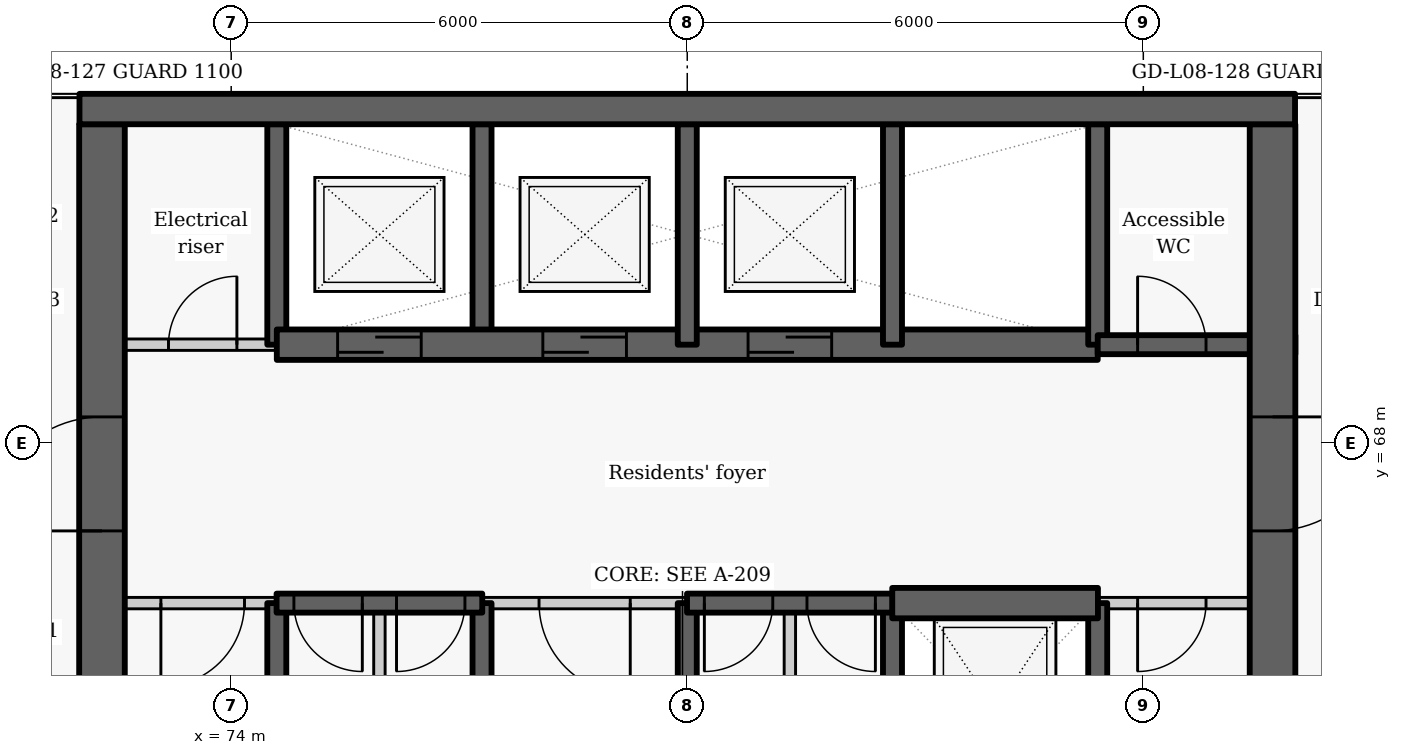
"""IFC4 building model, lengths in metres.
Left out: names, types, materials, properties, quantities, classifications, styles, units other than length and angle.
Written with IfcOpenShell. Run it as: python <this file> out.ifc"""

import sys

from ifc_helpers import new_model, si_unit, direction, frame, frame_2d, origin, place, context, subcontext, project, spatial, rectangle, extrude, element, fill, save


model = new_model("IFC4")
c1 = context("Model", 3, precision=1e-05, world=origin(), true_north=direction((0.0, 1.0)))
c2 = subcontext(c1, "Body", "Model", "MODEL_VIEW")
j1 = project(units=[si_unit("LENGTHUNIT", "METRE"), si_unit("PLANEANGLEUNIT", "RADIAN")], contexts=[c1])
p1 = place(None, origin())
s1 = spatial("IfcSite", under=j1, at=p1, CompositionType="ELEMENT")
p2 = place(p1, origin())
s2 = spatial("IfcBuilding", under=s1, at=p2, CompositionType="ELEMENT")
p3 = place(p2, frame((0.0, 0.0, 34.8)))
s3 = spatial("IfcBuildingStorey", under=s2, at=p3, CompositionType="ELEMENT", Elevation=34.8)
p4 = place(p3, frame((74.6, 63.1, -0.275), z_axis=(0.0, 0.0, 1.0), x_axis=(0.0, 1.0, 0.0)))
e1 = element("IfcWall", 1, at=p4, inside=s3, PredefinedType="SHEAR", context=c2, shape_type="SweptSolid", body=[
    extrude(rectangle(XDim=2.8, YDim=0.25, at=frame_2d((1.4, 0.0))), origin(), (0.0, 0.0, 1.0), 3.175),
])
p5 = place(p3, frame((74.6, 69.3, -0.275), z_axis=(0.0, 0.0, 1.0), x_axis=(0.0, 1.0, 0.0)))
e2 = element("IfcWall", 2, at=p5, inside=s3, PredefinedType="SHEAR", context=c2, shape_type="SweptSolid", body=[
    extrude(rectangle(XDim=2.9, YDim=0.25, at=frame_2d((1.45, 0.0))), origin(), (0.0, 0.0, 1.0), 3.175),
])
p6 = place(p3, frame((72.0, 69.3, 0.0), z_axis=(0.0, 0.0, 1.0), x_axis=(1.0, 0.0, 0.0)))
e3 = element("IfcWall", 3, at=p6, inside=s3, PredefinedType="PARTITIONING", context=c2, shape_type="SweptSolid", body=[
    extrude(rectangle(XDim=2.6, YDim=0.15, at=frame_2d((1.3, 0.0))), origin(), (0.0, 0.0, 1.0), 2.9),
])
p7 = place(p6, frame((1.175, 0.0, 0.0)))
e4 = element("IfcOpeningElement", 4, at=p7, cuts=e3, PredefinedType="OPENING", context=c2, shape_type="SweptSolid", body=[
    extrude(rectangle(XDim=0.9, YDim=2.1, at=frame_2d((0.45, 1.05))), frame((0.0, 0.085, 0.0), z_axis=(0.0, -1.0, 0.0), x_axis=(1.0, 0.0, 0.0)), (0.0, 0.0, 1.0), 0.17),
])
p8 = place(p3, frame((72.3, 63.1, -0.275), z_axis=(0.0, 0.0, 1.0), x_axis=(0.0, 1.0, 0.0)))
e5 = element("IfcWall", 5, at=p8, inside=s3, PredefinedType="SHEAR", context=c2, shape_type="SweptSolid", body=[
    extrude(rectangle(XDim=9.1, YDim=0.6, at=frame_2d((4.55, 0.0))), origin(), (0.0, 0.0, 1.0), 3.175),
])
p9 = place(p8, frame((3.75, 0.0, 0.275)))
e6 = element("IfcOpeningElement", 6, at=p9, cuts=e5, PredefinedType="OPENING", context=c2, shape_type="SweptSolid", body=[
    extrude(rectangle(XDim=1.5, YDim=2.1, at=frame_2d((0.75, 1.05))), frame((0.0, 0.31, 0.0), z_axis=(0.0, -1.0, 0.0), x_axis=(1.0, 0.0, 0.0)), (0.0, 0.0, 1.0), 0.62),
])
p10 = place(p3, frame((77.3, 63.1, -0.275), z_axis=(0.0, 0.0, 1.0), x_axis=(0.0, 1.0, 0.0)))
e7 = element("IfcWall", 7, at=p10, inside=s3, PredefinedType="SHEAR", context=c2, shape_type="SweptSolid", body=[
    extrude(rectangle(XDim=2.8, YDim=0.25, at=frame_2d((1.4, 0.0))), origin(), (0.0, 0.0, 1.0), 3.175),
])
p11 = place(p3, frame((77.3, 69.3, -0.275), z_axis=(0.0, 0.0, 1.0), x_axis=(0.0, 1.0, 0.0)))
e8 = element("IfcWall", 8, at=p11, inside=s3, PredefinedType="SHEAR", context=c2, shape_type="SweptSolid", body=[
    extrude(rectangle(XDim=2.9, YDim=0.25, at=frame_2d((1.45, 0.0))), origin(), (0.0, 0.0, 1.0), 3.175),
])
p12 = place(p3, frame((74.6, 69.3, -0.275), z_axis=(0.0, 0.0, 1.0), x_axis=(1.0, 0.0, 0.0)))
e9 = element("IfcWall", 9, at=p12, inside=s3, PredefinedType="SHEAR", context=c2, shape_type="SweptSolid", body=[
    extrude(rectangle(XDim=10.8, YDim=0.4, at=frame_2d((5.4, 0.0))), origin(), (0.0, 0.0, 1.0), 3.175),
])
p13 = place(p12, frame((0.8, 0.0, 0.275)))
e10 = element("IfcOpeningElement", 10, at=p13, cuts=e9, PredefinedType="OPENING", context=c2, shape_type="SweptSolid", body=[
    extrude(rectangle(XDim=1.1, YDim=2.1, at=frame_2d((0.55, 1.05))), frame((0.0, 0.21, 0.0), z_axis=(0.0, -1.0, 0.0), x_axis=(1.0, 0.0, 0.0)), (0.0, 0.0, 1.0), 0.42),
])
p14 = place(p12, frame((3.5, 0.0, 0.275)))
e11 = element("IfcOpeningElement", 11, at=p14, cuts=e9, PredefinedType="OPENING", context=c2, shape_type="SweptSolid", body=[
    extrude(rectangle(XDim=1.1, YDim=2.1, at=frame_2d((0.55, 1.05))), frame((0.0, 0.21, 0.0), z_axis=(0.0, -1.0, 0.0), x_axis=(1.0, 0.0, 0.0)), (0.0, 0.0, 1.0), 0.42),
])
p15 = place(p12, frame((6.2, 0.0, 0.275)))
e12 = element("IfcOpeningElement", 12, at=p15, cuts=e9, PredefinedType="OPENING", context=c2, shape_type="SweptSolid", body=[
    extrude(rectangle(XDim=1.1, YDim=2.1, at=frame_2d((0.55, 1.05))), frame((0.0, 0.21, 0.0), z_axis=(0.0, -1.0, 0.0), x_axis=(1.0, 0.0, 0.0)), (0.0, 0.0, 1.0), 0.42),
])
p16 = place(p3, frame((80.0, 63.1, -0.275), z_axis=(0.0, 0.0, 1.0), x_axis=(0.0, 1.0, 0.0)))
e13 = element("IfcWall", 13, at=p16, inside=s3, PredefinedType="SHEAR", context=c2, shape_type="SweptSolid", body=[
    extrude(rectangle(XDim=2.8, YDim=0.25, at=frame_2d((1.4, 0.0))), origin(), (0.0, 0.0, 1.0), 3.175),
])
p17 = place(p3, frame((80.0, 69.3, -0.275), z_axis=(0.0, 0.0, 1.0), x_axis=(0.0, 1.0, 0.0)))
e14 = element("IfcWall", 14, at=p17, inside=s3, PredefinedType="SHEAR", context=c2, shape_type="SweptSolid", body=[
    extrude(rectangle(XDim=2.9, YDim=0.25, at=frame_2d((1.45, 0.0))), origin(), (0.0, 0.0, 1.0), 3.175),
])
p18 = place(p3, frame((82.7, 63.1, -0.275), z_axis=(0.0, 0.0, 1.0), x_axis=(0.0, 1.0, 0.0)))
e15 = element("IfcWall", 15, at=p18, inside=s3, PredefinedType="SHEAR", context=c2, shape_type="SweptSolid", body=[
    extrude(rectangle(XDim=2.8, YDim=0.25, at=frame_2d((1.4, 0.0))), origin(), (0.0, 0.0, 1.0), 3.175),
])
p19 = place(p3, frame((82.7, 69.3, -0.275), z_axis=(0.0, 0.0, 1.0), x_axis=(0.0, 1.0, 0.0)))
e16 = element("IfcWall", 16, at=p19, inside=s3, PredefinedType="SHEAR", context=c2, shape_type="SweptSolid", body=[
    extrude(rectangle(XDim=2.9, YDim=0.25, at=frame_2d((1.45, 0.0))), origin(), (0.0, 0.0, 1.0), 3.175),
])
p20 = place(p3, frame((85.4, 63.1, -0.275), z_axis=(0.0, 0.0, 1.0), x_axis=(0.0, 1.0, 0.0)))
e17 = element("IfcWall", 17, at=p20, inside=s3, PredefinedType="SHEAR", context=c2, shape_type="SweptSolid", body=[
    extrude(rectangle(XDim=2.8, YDim=0.25, at=frame_2d((1.4, 0.0))), origin(), (0.0, 0.0, 1.0), 3.175),
])
p21 = place(p3, frame((85.4, 69.3, -0.275), z_axis=(0.0, 0.0, 1.0), x_axis=(0.0, 1.0, 0.0)))
e18 = element("IfcWall", 18, at=p21, inside=s3, PredefinedType="SHEAR", context=c2, shape_type="SweptSolid", body=[
    extrude(rectangle(XDim=2.9, YDim=0.25, at=frame_2d((1.45, 0.0))), origin(), (0.0, 0.0, 1.0), 3.175),
])
p22 = place(p3, frame((85.4, 69.3, -0.275), z_axis=(0.0, 0.0, 1.0), x_axis=(1.0, 0.0, 0.0)))
e19 = element("IfcWall", 19, at=p22, inside=s3, PredefinedType="SHEAR", context=c2, shape_type="SweptSolid", body=[
    extrude(rectangle(XDim=2.6, YDim=0.25, at=frame_2d((1.3, 0.0))), origin(), (0.0, 0.0, 1.0), 3.175),
])
p23 = place(p22, frame((0.525, 0.0, 0.275)))
e20 = element("IfcOpeningElement", 20, at=p23, cuts=e19, PredefinedType="OPENING", context=c2, shape_type="SweptSolid", body=[
    extrude(rectangle(XDim=0.9, YDim=2.1, at=frame_2d((0.45, 1.05))), frame((0.0, 0.135, 0.0), z_axis=(0.0, -1.0, 0.0), x_axis=(1.0, 0.0, 0.0)), (0.0, 0.0, 1.0), 0.27),
])
p24 = place(p3, frame((87.7, 72.2, -0.275), z_axis=(0.0, 0.0, 1.0), x_axis=(0.0, -1.0, 0.0)))
e21 = element("IfcWall", 21, at=p24, inside=s3, PredefinedType="SHEAR", context=c2, shape_type="SweptSolid", body=[
    extrude(rectangle(XDim=15.6, YDim=0.6, at=frame_2d((7.8, 0.0))), origin(), (0.0, 0.0, 1.0), 3.175),
])
p25 = place(p24, frame((3.85, 0.0, 0.275)))
e22 = element("IfcOpeningElement", 22, at=p25, cuts=e21, PredefinedType="OPENING", context=c2, shape_type="SweptSolid", body=[
    extrude(rectangle(XDim=1.5, YDim=2.1, at=frame_2d((0.75, 1.05))), frame((0.0, 0.31, 0.0), z_axis=(0.0, -1.0, 0.0), x_axis=(1.0, 0.0, 0.0)), (0.0, 0.0, 1.0), 0.62),
])
p26 = place(p24, frame((11.8, 0.0, 0.275)))
e23 = element("IfcOpeningElement", 23, at=p26, cuts=e21, PredefinedType="OPENING", context=c2, shape_type="SweptSolid", body=[
    extrude(rectangle(XDim=1.1, YDim=2.1, at=frame_2d((0.55, 1.05))), frame((0.0, 0.31, 0.0), z_axis=(0.0, -1.0, 0.0), x_axis=(1.0, 0.0, 0.0)), (0.0, 0.0, 1.0), 0.62),
])
p27 = place(p3, frame((74.603, 65.9, 0.0), z_axis=(0.0, 0.0, 1.0), x_axis=(-1.0, 0.0, 0.0)))
e24 = element("IfcWall", 24, at=p27, inside=s3, PredefinedType="PARTITIONING", context=c2, shape_type="SweptSolid", body=[
    extrude(rectangle(XDim=2.603, YDim=0.15, at=frame_2d((1.302, 0.0))), origin(), (0.0, 0.0, 1.0), 2.9),
])
p28 = place(p27, frame((0.428, 0.0, 0.0)))
e25 = element("IfcOpeningElement", 25, at=p28, cuts=e24, PredefinedType="OPENING", context=c2, shape_type="SweptSolid", body=[
    extrude(rectangle(XDim=1.1, YDim=2.1, at=frame_2d((0.55, 1.05))), frame((0.0, 0.085, 0.0), z_axis=(0.0, -1.0, 0.0), x_axis=(1.0, 0.0, 0.0)), (0.0, 0.0, 1.0), 0.17),
])
p29 = place(p3, frame((80.003, 65.9, 0.0), z_axis=(0.0, 0.0, 1.0), x_axis=(-1.0, 0.0, 0.0)))
e26 = element("IfcWall", 26, at=p29, inside=s3, PredefinedType="PARTITIONING", context=c2, shape_type="SweptSolid", body=[
    extrude(rectangle(XDim=2.706, YDim=0.15, at=frame_2d((1.353, 0.0))), origin(), (0.0, 0.0, 1.0), 2.9),
])
p30 = place(p29, frame((0.753, 0.0, 0.0)))
e27 = element("IfcOpeningElement", 27, at=p30, cuts=e26, PredefinedType="OPENING", context=c2, shape_type="SweptSolid", body=[
    extrude(rectangle(XDim=1.2, YDim=2.1, at=frame_2d((0.6, 1.05))), frame((0.0, 0.085, 0.0), z_axis=(0.0, -1.0, 0.0), x_axis=(1.0, 0.0, 0.0)), (0.0, 0.0, 1.0), 0.17),
])
p31 = place(p3, frame((88.0, 65.9, 0.0), z_axis=(0.0, 0.0, 1.0), x_axis=(-1.0, 0.0, 0.0)))
e28 = element("IfcWall", 28, at=p31, inside=s3, PredefinedType="PARTITIONING", context=c2, shape_type="SweptSolid", body=[
    extrude(rectangle(XDim=2.603, YDim=0.15, at=frame_2d((1.302, 0.0))), origin(), (0.0, 0.0, 1.0), 2.9),
])
p32 = place(p31, frame((1.175, 0.0, 0.0)))
e29 = element("IfcOpeningElement", 29, at=p32, cuts=e28, PredefinedType="OPENING", context=c2, shape_type="SweptSolid", body=[
    extrude(rectangle(XDim=0.9, YDim=2.1, at=frame_2d((0.45, 1.05))), frame((0.0, 0.085, 0.0), z_axis=(0.0, -1.0, 0.0), x_axis=(1.0, 0.0, 0.0)), (0.0, 0.0, 1.0), 0.17),
])
p33 = place(p3, frame((77.303, 65.9, -0.275), z_axis=(0.0, 0.0, 1.0), x_axis=(-1.0, 0.0, 0.0)))
e30 = element("IfcWall", 30, at=p33, inside=s3, PredefinedType="SHEAR", context=c2, shape_type="SweptSolid", body=[
    extrude(rectangle(XDim=2.706, YDim=0.25, at=frame_2d((1.353, 0.0))), origin(), (0.0, 0.0, 1.0), 3.175),
])
p34 = place(p33, frame((1.578, 0.0, 0.275)))
e31 = element("IfcOpeningElement", 31, at=p34, cuts=e30, PredefinedType="OPENING", context=c2, shape_type="SweptSolid", body=[
    extrude(rectangle(XDim=0.9, YDim=2.1, at=frame_2d((0.45, 1.05))), frame((0.0, 0.135, 0.0), z_axis=(0.0, -1.0, 0.0), x_axis=(1.0, 0.0, 0.0)), (0.0, 0.0, 1.0), 0.27),
])
p35 = place(p33, frame((0.228, 0.0, 0.275)))
e32 = element("IfcOpeningElement", 32, at=p35, cuts=e30, PredefinedType="OPENING", context=c2, shape_type="SweptSolid", body=[
    extrude(rectangle(XDim=0.9, YDim=2.1, at=frame_2d((0.45, 1.05))), frame((0.0, 0.135, 0.0), z_axis=(0.0, -1.0, 0.0), x_axis=(1.0, 0.0, 0.0)), (0.0, 0.0, 1.0), 0.27),
])
p36 = place(p3, frame((82.703, 65.9, -0.275), z_axis=(0.0, 0.0, 1.0), x_axis=(-1.0, 0.0, 0.0)))
e33 = element("IfcWall", 33, at=p36, inside=s3, PredefinedType="SHEAR", context=c2, shape_type="SweptSolid", body=[
    extrude(rectangle(XDim=2.706, YDim=0.25, at=frame_2d((1.353, 0.0))), origin(), (0.0, 0.0, 1.0), 3.175),
])
p37 = place(p36, frame((1.578, 0.0, 0.275)))
e34 = element("IfcOpeningElement", 34, at=p37, cuts=e33, PredefinedType="OPENING", context=c2, shape_type="SweptSolid", body=[
    extrude(rectangle(XDim=0.9, YDim=2.1, at=frame_2d((0.45, 1.05))), frame((0.0, 0.135, 0.0), z_axis=(0.0, -1.0, 0.0), x_axis=(1.0, 0.0, 0.0)), (0.0, 0.0, 1.0), 0.27),
])
p38 = place(p36, frame((0.228, 0.0, 0.275)))
e35 = element("IfcOpeningElement", 35, at=p38, cuts=e33, PredefinedType="OPENING", context=c2, shape_type="SweptSolid", body=[
    extrude(rectangle(XDim=0.9, YDim=2.1, at=frame_2d((0.45, 1.05))), frame((0.0, 0.135, 0.0), z_axis=(0.0, -1.0, 0.0), x_axis=(1.0, 0.0, 0.0)), (0.0, 0.0, 1.0), 0.27),
])
p39 = place(p3, frame((82.697, 65.9, -0.275), z_axis=(0.0, 0.0, 1.0), x_axis=(1.0, 0.0, 0.0)))
e36 = element("IfcWall", 36, at=p39, inside=s3, PredefinedType="SHEAR", context=c2, shape_type="SweptSolid", body=[
    extrude(rectangle(XDim=2.706, YDim=0.4, at=frame_2d((1.353, 0.0))), origin(), (0.0, 0.0, 1.0), 3.175),
])
for number, where, z_axis, x_axis in (
    (37, (75.95, 63.1, 0.0), (0.0, 0.0, 1.0), (0.0, 1.0, 0.0)),
    (38, (81.35, 63.1, 0.0), (0.0, 0.0, 1.0), (0.0, 1.0, 0.0)),
):
    element("IfcWall", number, at=place(p3, frame(where, z_axis=z_axis, x_axis=x_axis)), inside=s3, PredefinedType="PARTITIONING", context=c2, shape_type="SweptSolid", body=[
        extrude(rectangle(XDim=2.8, YDim=0.15, at=frame_2d((1.4, 0.0))), origin(), (0.0, 0.0, 1.0), 2.9),
    ])
p40 = place(p3, frame((72.004, 72.4, -0.275), z_axis=(0.0, 0.0, 1.0), x_axis=(1.0, 0.0, 0.0)))
e39 = element("IfcWall", 39, at=p40, inside=s3, PredefinedType="SHEAR", context=c2, shape_type="SweptSolid", body=[
    extrude(rectangle(XDim=15.992, YDim=0.4, at=frame_2d((7.996, 0.0))), origin(), (0.0, 0.0, 1.0), 3.175),
])
p41 = place(p7, origin())
e40 = element("IfcDoor", 40, at=p41, inside=s3, OperationType="SINGLE_SWING_RIGHT", PredefinedType="DOOR", context=c2, shape_type="SweptSolid", body=[
    extrude(rectangle(XDim=0.9, YDim=2.1, at=frame_2d((0.45, 1.05))), frame((0.0, 0.025, 0.0), z_axis=(0.0, -1.0, 0.0), x_axis=(1.0, 0.0, 0.0)), (0.0, 0.0, 1.0), 0.05),
])
fill(e4, e40)
p42 = place(p13, origin())
e41 = element("IfcDoor", 41, at=p42, inside=s3, OperationType="SLIDING_TO_LEFT", PredefinedType="DOOR", context=c2, shape_type="SweptSolid", body=[
    extrude(rectangle(XDim=1.1, YDim=2.1, at=frame_2d((0.55, 1.05))), frame((0.0, 0.025, 0.0), z_axis=(0.0, -1.0, 0.0), x_axis=(1.0, 0.0, 0.0)), (0.0, 0.0, 1.0), 0.05),
])
fill(e10, e41)
p43 = place(p14, origin())
e42 = element("IfcDoor", 42, at=p43, inside=s3, OperationType="SLIDING_TO_LEFT", PredefinedType="DOOR", context=c2, shape_type="SweptSolid", body=[
    extrude(rectangle(XDim=1.1, YDim=2.1, at=frame_2d((0.55, 1.05))), frame((0.0, 0.025, 0.0), z_axis=(0.0, -1.0, 0.0), x_axis=(1.0, 0.0, 0.0)), (0.0, 0.0, 1.0), 0.05),
])
fill(e11, e42)
p44 = place(p15, origin())
e43 = element("IfcDoor", 43, at=p44, inside=s3, OperationType="SLIDING_TO_LEFT", PredefinedType="DOOR", context=c2, shape_type="SweptSolid", body=[
    extrude(rectangle(XDim=1.1, YDim=2.1, at=frame_2d((0.55, 1.05))), frame((0.0, 0.025, 0.0), z_axis=(0.0, -1.0, 0.0), x_axis=(1.0, 0.0, 0.0)), (0.0, 0.0, 1.0), 0.05),
])
fill(e12, e43)
p45 = place(p23, origin())
e44 = element("IfcDoor", 44, at=p45, inside=s3, OperationType="SINGLE_SWING_LEFT", PredefinedType="DOOR", context=c2, shape_type="SweptSolid", body=[
    extrude(rectangle(XDim=0.9, YDim=2.1, at=frame_2d((0.45, 1.05))), frame((0.0, 0.025, 0.0), z_axis=(0.0, -1.0, 0.0), x_axis=(1.0, 0.0, 0.0)), (0.0, 0.0, 1.0), 0.05),
])
fill(e20, e44)
p46 = place(p28, origin())
e45 = element("IfcDoor", 45, at=p46, inside=s3, OperationType="SINGLE_SWING_RIGHT", PredefinedType="DOOR", context=c2, shape_type="SweptSolid", body=[
    extrude(rectangle(XDim=1.1, YDim=2.1, at=frame_2d((0.55, 1.05))), frame((0.0, 0.025, 0.0), z_axis=(0.0, -1.0, 0.0), x_axis=(1.0, 0.0, 0.0)), (0.0, 0.0, 1.0), 0.05),
])
fill(e25, e45)
p47 = place(p34, origin())
e46 = element("IfcDoor", 46, at=p47, inside=s3, OperationType="SINGLE_SWING_LEFT", PredefinedType="DOOR", context=c2, shape_type="SweptSolid", body=[
    extrude(rectangle(XDim=0.9, YDim=2.1, at=frame_2d((0.45, 1.05))), frame((0.0, 0.025, 0.0), z_axis=(0.0, -1.0, 0.0), x_axis=(1.0, 0.0, 0.0)), (0.0, 0.0, 1.0), 0.05),
])
fill(e31, e46)
p48 = place(p35, origin())
e47 = element("IfcDoor", 47, at=p48, inside=s3, OperationType="SINGLE_SWING_RIGHT", PredefinedType="DOOR", context=c2, shape_type="SweptSolid", body=[
    extrude(rectangle(XDim=0.9, YDim=2.1, at=frame_2d((0.45, 1.05))), frame((0.0, 0.025, 0.0), z_axis=(0.0, -1.0, 0.0), x_axis=(1.0, 0.0, 0.0)), (0.0, 0.0, 1.0), 0.05),
])
fill(e32, e47)
p49 = place(p30, origin())
e48 = element("IfcDoor", 48, at=p49, inside=s3, OperationType="DOUBLE_DOOR_SINGLE_SWING", PredefinedType="DOOR", context=c2, shape_type="SweptSolid", body=[
    extrude(rectangle(XDim=1.2, YDim=2.1, at=frame_2d((0.6, 1.05))), frame((0.0, 0.025, 0.0), z_axis=(0.0, -1.0, 0.0), x_axis=(1.0, 0.0, 0.0)), (0.0, 0.0, 1.0), 0.05),
])
fill(e27, e48)
p50 = place(p37, origin())
e49 = element("IfcDoor", 49, at=p50, inside=s3, OperationType="SINGLE_SWING_RIGHT", PredefinedType="DOOR", context=c2, shape_type="SweptSolid", body=[
    extrude(rectangle(XDim=0.9, YDim=2.1, at=frame_2d((0.45, 1.05))), frame((0.0, 0.025, 0.0), z_axis=(0.0, -1.0, 0.0), x_axis=(1.0, 0.0, 0.0)), (0.0, 0.0, 1.0), 0.05),
])
fill(e34, e49)
p51 = place(p38, origin())
e50 = element("IfcDoor", 50, at=p51, inside=s3, OperationType="SINGLE_SWING_LEFT", PredefinedType="DOOR", context=c2, shape_type="SweptSolid", body=[
    extrude(rectangle(XDim=0.9, YDim=2.1, at=frame_2d((0.45, 1.05))), frame((0.0, 0.025, 0.0), z_axis=(0.0, -1.0, 0.0), x_axis=(1.0, 0.0, 0.0)), (0.0, 0.0, 1.0), 0.05),
])
fill(e35, e50)
p52 = place(p32, origin())
e51 = element("IfcDoor", 51, at=p52, inside=s3, OperationType="SINGLE_SWING_RIGHT", PredefinedType="DOOR", context=c2, shape_type="SweptSolid", body=[
    extrude(rectangle(XDim=0.9, YDim=2.1, at=frame_2d((0.45, 1.05))), frame((0.0, 0.025, 0.0), z_axis=(0.0, -1.0, 0.0), x_axis=(1.0, 0.0, 0.0)), (0.0, 0.0, 1.0), 0.05),
])
fill(e29, e51)
p53 = place(p25, origin())
e52 = element("IfcDoor", 52, at=p53, inside=s3, OperationType="DOUBLE_DOOR_SINGLE_SWING", PredefinedType="DOOR", context=c2, shape_type="SweptSolid", body=[
    extrude(rectangle(XDim=1.5, YDim=2.1, at=frame_2d((0.75, 1.05))), frame((0.0, 0.025, 0.0), z_axis=(0.0, -1.0, 0.0), x_axis=(1.0, 0.0, 0.0)), (0.0, 0.0, 1.0), 0.05),
])
fill(e22, e52)
p54 = place(p9, origin())
e53 = element("IfcDoor", 53, at=p54, inside=s3, OperationType="DOUBLE_DOOR_SINGLE_SWING", PredefinedType="DOOR", context=c2, shape_type="SweptSolid", body=[
    extrude(rectangle(XDim=1.5, YDim=2.1, at=frame_2d((0.75, 1.05))), frame((0.0, 0.025, 0.0), z_axis=(0.0, -1.0, 0.0), x_axis=(1.0, 0.0, 0.0)), (0.0, 0.0, 1.0), 0.05),
])
fill(e6, e53)
save(model, sys.argv[1])
